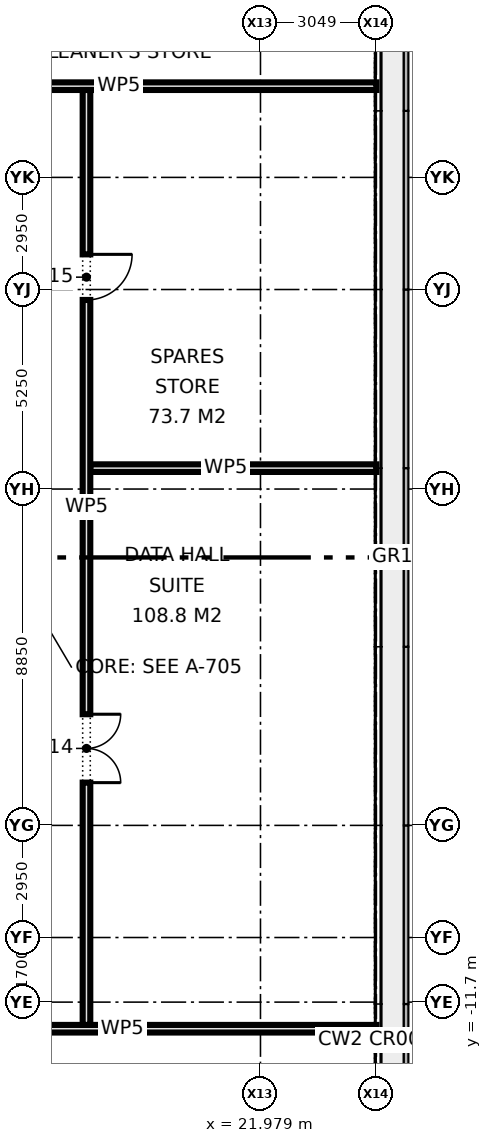
"""IFC4 building model, lengths in metres.
Left out: names, types, materials, properties, quantities, classifications, styles, units other than length and angle.
Written with IfcOpenShell. Run it as: python <this file> out.ifc"""

import sys

from ifc_helpers import new_model, si_unit, direction, frame, frame_2d, origin, place, context, subcontext, project, spatial, rectangle, extrude, element, fill, save


model = new_model("IFC4")
c1 = context("Model", 3, precision=1e-05, world=origin(), true_north=direction((0.0, 1.0)))
c2 = subcontext(c1, "Body", "Model", "MODEL_VIEW")
j1 = project(units=[si_unit("LENGTHUNIT", "METRE"), si_unit("PLANEANGLEUNIT", "RADIAN")], contexts=[c1])
p1 = place(None, origin())
s1 = spatial("IfcSite", under=j1, at=p1, CompositionType="ELEMENT")
p2 = place(p1, origin())
s2 = spatial("IfcBuilding", under=s1, at=p2, CompositionType="ELEMENT")
p3 = place(p2, frame((0.0, 0.0, 16.1)))
s3 = spatial("IfcBuildingStorey", under=s2, at=p3, CompositionType="ELEMENT", Elevation=16.1)
p4 = place(p3, frame((11.65, -12.4, 0.0), z_axis=(0.0, 0.0, 1.0), x_axis=(1.0, 0.0, 0.0)))
e1 = element("IfcWall", 1, at=p4, inside=s3, PredefinedType="PARTITIONING", context=c2, shape_type="SweptSolid", body=[
    extrude(rectangle(XDim=13.38, YDim=0.2, at=frame_2d((6.69, 0.0))), origin(), (0.0, 0.0, 1.0), 4.575),
])
p5 = place(p3, frame((17.5, 2.35, 0.0), z_axis=(0.0, 0.0, 1.0), x_axis=(1.0, 0.0, 0.0)))
e2 = element("IfcWall", 2, at=p5, inside=s3, PredefinedType="PARTITIONING", context=c2, shape_type="SweptSolid", body=[
    extrude(rectangle(XDim=7.53, YDim=0.2, at=frame_2d((3.765, 0.0))), origin(), (0.0, 0.0, 1.0), 4.575),
])
p6 = place(p3, frame((-25.03, 12.4, 0.0), z_axis=(0.0, 0.0, 1.0), x_axis=(1.0, 0.0, 0.0)))
e3 = element("IfcWall", 3, at=p6, inside=s3, PredefinedType="PARTITIONING", context=c2, shape_type="SweptSolid", body=[
    extrude(rectangle(XDim=50.06, YDim=0.2, at=frame_2d((25.03, 0.0))), origin(), (0.0, 0.0, 1.0), 4.575),
])
p7 = place(p6, frame((21.18, 0.0, 0.0)))
e4 = element("IfcOpeningElement", 4, at=p7, cuts=e3, PredefinedType="OPENING", context=c2, shape_type="SweptSolid", body=[
    extrude(rectangle(XDim=1.8, YDim=2.1, at=frame_2d((0.9, 1.05))), frame((0.0, 0.11, 0.0), z_axis=(0.0, -1.0, 0.0), x_axis=(1.0, 0.0, 0.0)), (0.0, 0.0, 1.0), 0.22),
])
p8 = place(p6, frame((9.58, 0.0, 0.0)))
e5 = element("IfcOpeningElement", 5, at=p8, cuts=e3, PredefinedType="OPENING", context=c2, shape_type="SweptSolid", body=[
    extrude(rectangle(XDim=1.0, YDim=2.1, at=frame_2d((0.5, 1.05))), frame((0.0, 0.11, 0.0), z_axis=(0.0, -1.0, 0.0), x_axis=(1.0, 0.0, 0.0)), (0.0, 0.0, 1.0), 0.22),
])
p9 = place(p6, frame((12.58, 0.0, 0.0)))
e6 = element("IfcOpeningElement", 6, at=p9, cuts=e3, PredefinedType="OPENING", context=c2, shape_type="SweptSolid", body=[
    extrude(rectangle(XDim=1.0, YDim=2.1, at=frame_2d((0.5, 1.05))), frame((0.0, 0.11, 0.0), z_axis=(0.0, -1.0, 0.0), x_axis=(1.0, 0.0, 0.0)), (0.0, 0.0, 1.0), 0.22),
])
p10 = place(p6, frame((15.18, 0.0, 0.0)))
e7 = element("IfcOpeningElement", 7, at=p10, cuts=e3, PredefinedType="OPENING", context=c2, shape_type="SweptSolid", body=[
    extrude(rectangle(XDim=1.0, YDim=2.1, at=frame_2d((0.5, 1.05))), frame((0.0, 0.11, 0.0), z_axis=(0.0, -1.0, 0.0), x_axis=(1.0, 0.0, 0.0)), (0.0, 0.0, 1.0), 0.22),
])
p11 = place(p6, frame((34.01, 0.0, 0.0)))
e8 = element("IfcOpeningElement", 8, at=p11, cuts=e3, PredefinedType="OPENING", context=c2, shape_type="SweptSolid", body=[
    extrude(rectangle(XDim=1.8, YDim=2.1, at=frame_2d((0.9, 1.05))), frame((0.0, 0.11, 0.0), z_axis=(0.0, -1.0, 0.0), x_axis=(1.0, 0.0, 0.0)), (0.0, 0.0, 1.0), 0.22),
])
p12 = place(p3, frame((17.4, -12.3, 0.0), z_axis=(0.0, 0.0, 1.0), x_axis=(0.0, 1.0, 0.0)))
e9 = element("IfcWall", 9, at=p12, inside=s3, PredefinedType="PARTITIONING", context=c2, shape_type="SweptSolid", body=[
    extrude(rectangle(XDim=24.6, YDim=0.2, at=frame_2d((12.3, 0.0))), origin(), (0.0, 0.0, 1.0), 4.575),
])
p13 = place(p12, frame((6.375, 0.0, 0.0)))
e10 = element("IfcOpeningElement", 10, at=p13, cuts=e9, PredefinedType="OPENING", context=c2, shape_type="SweptSolid", body=[
    extrude(rectangle(XDim=1.8, YDim=2.1, at=frame_2d((0.9, 1.05))), frame((0.0, 0.11, 0.0), z_axis=(0.0, -1.0, 0.0), x_axis=(1.0, 0.0, 0.0)), (0.0, 0.0, 1.0), 0.22),
])
p14 = place(p12, frame((19.075, 0.0, 0.0)))
e11 = element("IfcOpeningElement", 11, at=p14, cuts=e9, PredefinedType="OPENING", context=c2, shape_type="SweptSolid", body=[
    extrude(rectangle(XDim=1.2, YDim=2.1, at=frame_2d((0.6, 1.05))), frame((0.0, 0.11, 0.0), z_axis=(0.0, -1.0, 0.0), x_axis=(1.0, 0.0, 0.0)), (0.0, 0.0, 1.0), 0.22),
])
p15 = place(p13, frame((1.8, 0.0, 0.0), z_axis=(0.0, 0.0, 1.0), x_axis=(-1.0, 0.0, 0.0)))
e12 = element("IfcDoor", 12, at=p15, inside=s3, OperationType="DOUBLE_DOOR_SINGLE_SWING", PredefinedType="DOOR", context=c2, shape_type="SweptSolid", body=[
    extrude(rectangle(XDim=1.8, YDim=2.1, at=frame_2d((0.9, 1.05))), frame((0.0, 0.025, 0.0), z_axis=(0.0, -1.0, 0.0), x_axis=(1.0, 0.0, 0.0)), (0.0, 0.0, 1.0), 0.05),
])
fill(e10, e12)
p16 = place(p14, frame((1.2, 0.0, 0.0), z_axis=(0.0, 0.0, 1.0), x_axis=(-1.0, 0.0, 0.0)))
e13 = element("IfcDoor", 13, at=p16, inside=s3, OperationType="SINGLE_SWING_LEFT", PredefinedType="DOOR", context=c2, shape_type="SweptSolid", body=[
    extrude(rectangle(XDim=1.2, YDim=2.1, at=frame_2d((0.6, 1.05))), frame((0.0, 0.025, 0.0), z_axis=(0.0, -1.0, 0.0), x_axis=(1.0, 0.0, 0.0)), (0.0, 0.0, 1.0), 0.05),
])
fill(e11, e13)
save(model, sys.argv[1])
